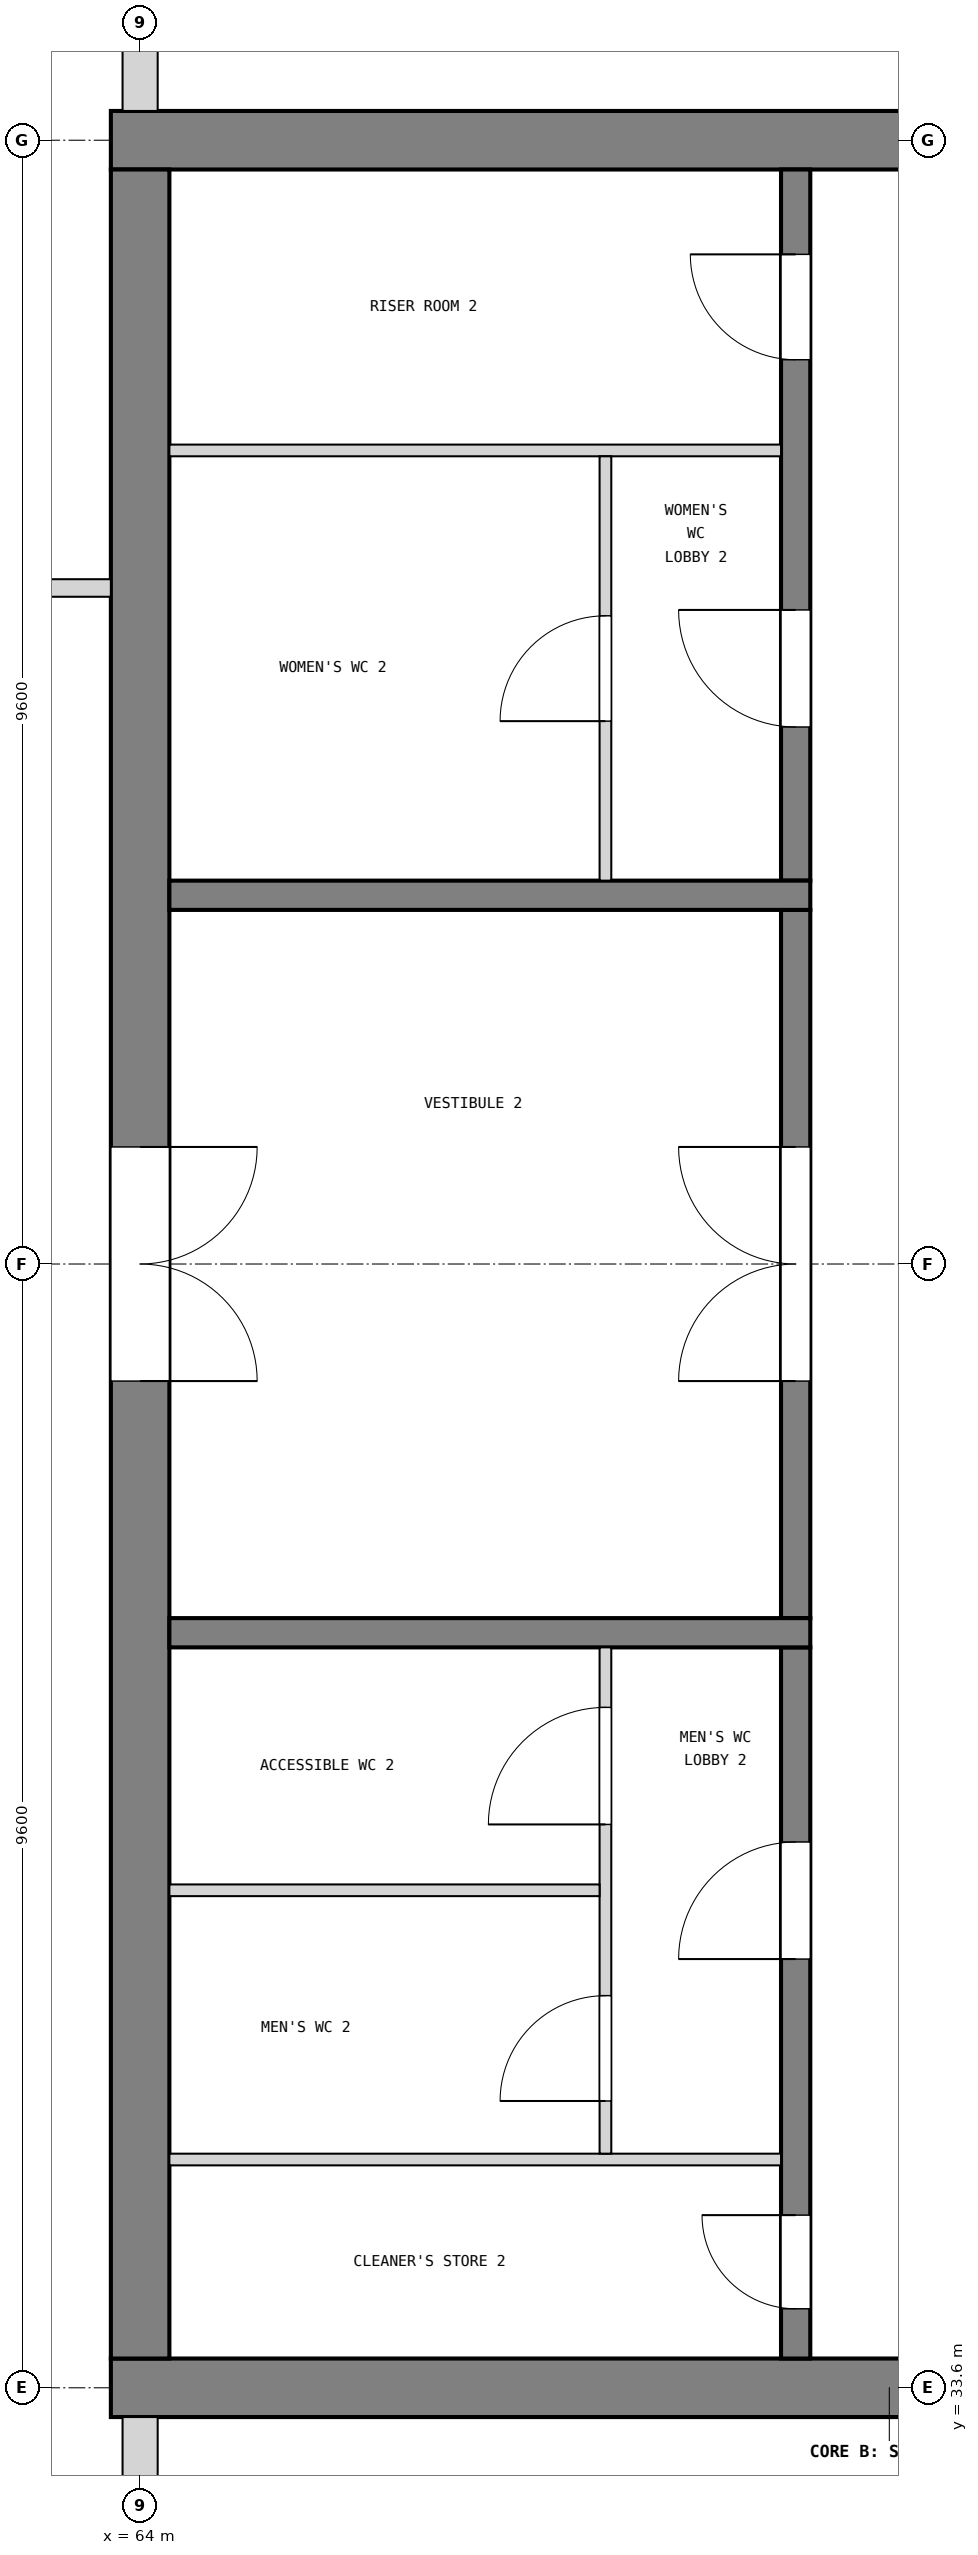
"""IFC4 building model, lengths in metres.
Left out: names, types, materials, properties, quantities, classifications, styles, units other than length and angle.
Written with IfcOpenShell. Run it as: python <this file> out.ifc"""

import sys

from ifc_helpers import new_model, si_unit, direction, frame, frame_2d, origin, place, context, subcontext, project, spatial, rectangle, extrude, element, fill, save


model = new_model("IFC4")
c1 = context("Model", 3, precision=1e-05, world=origin(), true_north=direction((0.0, 1.0)))
c2 = subcontext(c1, "Body", "Model", "MODEL_VIEW")
j1 = project(units=[si_unit("LENGTHUNIT", "METRE"), si_unit("PLANEANGLEUNIT", "RADIAN")], contexts=[c1])
p1 = place(None, origin())
s1 = spatial("IfcSite", under=j1, at=p1, CompositionType="ELEMENT")
p2 = place(p1, origin())
s2 = spatial("IfcBuilding", under=s1, at=p2, CompositionType="ELEMENT")
p3 = place(p2, frame((0.0, 0.0, 32.7)))
s3 = spatial("IfcBuildingStorey", under=s2, at=p3, CompositionType="ELEMENT", Elevation=32.7)
p4 = place(p3, frame((63.75, 52.8, 0.0), z_axis=(0.0, 0.0, 1.0), x_axis=(1.0, 0.0, 0.0)))
e1 = element("IfcWall", 1, at=p4, inside=s3, PredefinedType="SHEAR", context=c2, shape_type="SweptSolid", body=[
    extrude(rectangle(XDim=13.3, YDim=0.5, at=frame_2d((6.65, 0.0))), origin(), (0.0, 0.0, 1.0), 3.9),
])
p5 = place(p4, frame((11.05, 0.0, 1.0)))
e2 = element("IfcOpeningElement", 2, at=p5, cuts=e1, PredefinedType="OPENING", context=c2, shape_type="SweptSolid", body=[
    extrude(rectangle(XDim=0.4, YDim=2.0, at=frame_2d((0.2, 1.0))), frame((0.0, 0.26, 0.0), z_axis=(0.0, -1.0, 0.0), x_axis=(1.0, 0.0, 0.0)), (0.0, 0.0, 1.0), 0.52),
])
p6 = place(p3, frame((63.75, 33.6, 0.0), z_axis=(0.0, 0.0, 1.0), x_axis=(1.0, 0.0, 0.0)))
e3 = element("IfcWall", 3, at=p6, inside=s3, PredefinedType="SHEAR", context=c2, shape_type="SweptSolid", body=[
    extrude(rectangle(XDim=13.3, YDim=0.5, at=frame_2d((6.65, 0.0))), origin(), (0.0, 0.0, 1.0), 3.9),
])
p7 = place(p6, frame((11.05, 0.0, 1.0)))
e4 = element("IfcOpeningElement", 4, at=p7, cuts=e3, PredefinedType="OPENING", context=c2, shape_type="SweptSolid", body=[
    extrude(rectangle(XDim=0.4, YDim=2.0, at=frame_2d((0.2, 1.0))), frame((0.0, 0.26, 0.0), z_axis=(0.0, -1.0, 0.0), x_axis=(1.0, 0.0, 0.0)), (0.0, 0.0, 1.0), 0.52),
])
p8 = place(p3, frame((64.0, 33.85, 0.0), z_axis=(0.0, 0.0, 1.0), x_axis=(0.0, 1.0, 0.0)))
e5 = element("IfcWall", 5, at=p8, inside=s3, PredefinedType="SHEAR", context=c2, shape_type="SweptSolid", body=[
    extrude(rectangle(XDim=18.7, YDim=0.5, at=frame_2d((9.35, 0.0))), origin(), (0.0, 0.0, 1.0), 3.9),
])
p9 = place(p8, frame((8.35, 0.0, 0.0)))
e6 = element("IfcOpeningElement", 6, at=p9, cuts=e5, PredefinedType="OPENING", context=c2, shape_type="SweptSolid", body=[
    extrude(rectangle(XDim=2.0, YDim=2.1, at=frame_2d((1.0, 1.05))), frame((0.0, 0.26, 0.0), z_axis=(0.0, -1.0, 0.0), x_axis=(1.0, 0.0, 0.0)), (0.0, 0.0, 1.0), 0.52),
])
p10 = place(p3, frame((64.0, 31.0, 0.0), z_axis=(0.0, 0.0, 1.0), x_axis=(0.0, 1.0, 0.0)))
e7 = element("IfcWall", 7, at=p10, inside=s3, PredefinedType="SOLIDWALL", context=c2, shape_type="SweptSolid", body=[
    extrude(rectangle(XDim=2.35, YDim=0.3, at=frame_2d((1.175, 0.0))), origin(), (0.0, 0.0, 1.0), 2.88),
])
p11 = place(p3, frame((64.0, 53.05, 0.0), z_axis=(0.0, 0.0, 1.0), x_axis=(0.0, 1.0, 0.0)))
e8 = element("IfcWall", 8, at=p11, inside=s3, PredefinedType="SOLIDWALL", context=c2, shape_type="SweptSolid", body=[
    extrude(rectangle(XDim=2.35, YDim=0.3, at=frame_2d((1.175, 0.0))), origin(), (0.0, 0.0, 1.0), 2.88),
])
p12 = place(p3, frame((69.6, 33.85, 0.0), z_axis=(0.0, 0.0, 1.0), x_axis=(0.0, 1.0, 0.0)))
e9 = element("IfcWall", 9, at=p12, inside=s3, PredefinedType="SOLIDWALL", context=c2, shape_type="SweptSolid", body=[
    extrude(rectangle(XDim=6.075, YDim=0.25, at=frame_2d((3.038, 0.0))), origin(), (0.0, 0.0, 1.0), 3.6),
])
p13 = place(p12, frame((0.425, 0.0, 0.0)))
e10 = element("IfcOpeningElement", 10, at=p13, cuts=e9, PredefinedType="OPENING", context=c2, shape_type="SweptSolid", body=[
    extrude(rectangle(XDim=0.8, YDim=2.1, at=frame_2d((0.4, 1.05))), frame((0.0, 0.135, 0.0), z_axis=(0.0, -1.0, 0.0), x_axis=(1.0, 0.0, 0.0)), (0.0, 0.0, 1.0), 0.27),
])
p14 = place(p12, frame((3.413, 0.0, 0.0)))
e11 = element("IfcOpeningElement", 11, at=p14, cuts=e9, PredefinedType="OPENING", context=c2, shape_type="SweptSolid", body=[
    extrude(rectangle(XDim=1.0, YDim=2.1, at=frame_2d((0.5, 1.05))), frame((0.0, 0.135, 0.0), z_axis=(0.0, -1.0, 0.0), x_axis=(1.0, 0.0, 0.0)), (0.0, 0.0, 1.0), 0.27),
])
p15 = place(p3, frame((69.6, 40.175, 0.0), z_axis=(0.0, 0.0, 1.0), x_axis=(0.0, 1.0, 0.0)))
e12 = element("IfcWall", 12, at=p15, inside=s3, PredefinedType="SOLIDWALL", context=c2, shape_type="SweptSolid", body=[
    extrude(rectangle(XDim=6.05, YDim=0.25, at=frame_2d((3.025, 0.0))), origin(), (0.0, 0.0, 1.0), 3.6),
])
p16 = place(p15, frame((2.025, 0.0, 0.0)))
e13 = element("IfcOpeningElement", 13, at=p16, cuts=e12, PredefinedType="OPENING", context=c2, shape_type="SweptSolid", body=[
    extrude(rectangle(XDim=2.0, YDim=2.1, at=frame_2d((1.0, 1.05))), frame((0.0, 0.135, 0.0), z_axis=(0.0, -1.0, 0.0), x_axis=(1.0, 0.0, 0.0)), (0.0, 0.0, 1.0), 0.27),
])
p17 = place(p3, frame((69.6, 46.475, 0.0), z_axis=(0.0, 0.0, 1.0), x_axis=(0.0, 1.0, 0.0)))
e14 = element("IfcWall", 14, at=p17, inside=s3, PredefinedType="SOLIDWALL", context=c2, shape_type="SweptSolid", body=[
    extrude(rectangle(XDim=6.075, YDim=0.25, at=frame_2d((3.038, 0.0))), origin(), (0.0, 0.0, 1.0), 3.6),
])
p18 = place(p17, frame((1.312, 0.0, 0.0)))
e15 = element("IfcOpeningElement", 15, at=p18, cuts=e14, PredefinedType="OPENING", context=c2, shape_type="SweptSolid", body=[
    extrude(rectangle(XDim=1.0, YDim=2.1, at=frame_2d((0.5, 1.05))), frame((0.0, 0.135, 0.0), z_axis=(0.0, -1.0, 0.0), x_axis=(1.0, 0.0, 0.0)), (0.0, 0.0, 1.0), 0.27),
])
p19 = place(p17, frame((4.45, 0.0, 0.0)))
e16 = element("IfcOpeningElement", 16, at=p19, cuts=e14, PredefinedType="OPENING", context=c2, shape_type="SweptSolid", body=[
    extrude(rectangle(XDim=0.9, YDim=2.1, at=frame_2d((0.45, 1.05))), frame((0.0, 0.135, 0.0), z_axis=(0.0, -1.0, 0.0), x_axis=(1.0, 0.0, 0.0)), (0.0, 0.0, 1.0), 0.27),
])
for number, where, z_axis, x_axis in (
    (17, (69.725, 40.05, 0.0), (0.0, 0.0, 1.0), (-1.0, 0.0, 0.0)),
    (18, (69.725, 46.35, 0.0), (0.0, 0.0, 1.0), (-1.0, 0.0, 0.0)),
):
    element("IfcWall", number, at=place(p3, frame(where, z_axis=z_axis, x_axis=x_axis)), inside=s3, PredefinedType="SOLIDWALL", context=c2, shape_type="SweptSolid", body=[
        extrude(rectangle(XDim=5.475, YDim=0.25, at=frame_2d((2.738, 0.0))), origin(), (0.0, 0.0, 1.0), 3.6),
    ])
p20 = place(p3, frame((69.475, 35.55, 0.0), z_axis=(0.0, 0.0, 1.0), x_axis=(-1.0, 0.0, 0.0)))
e19 = element("IfcWall", 19, at=p20, inside=s3, PredefinedType="PARTITIONING", context=c2, shape_type="SweptSolid", body=[
    extrude(rectangle(XDim=5.225, YDim=0.1, at=frame_2d((2.613, 0.0))), origin(), (0.0, 0.0, 1.0), 3.6),
])
p21 = place(p3, frame((67.975, 35.6, 0.0), z_axis=(0.0, 0.0, 1.0), x_axis=(0.0, 1.0, 0.0)))
e20 = element("IfcWall", 20, at=p21, inside=s3, PredefinedType="PARTITIONING", context=c2, shape_type="SweptSolid", body=[
    extrude(rectangle(XDim=4.325, YDim=0.1, at=frame_2d((2.163, 0.0))), origin(), (0.0, 0.0, 1.0), 3.6),
])
p22 = place(p21, frame((0.45, 0.0, 0.0)))
e21 = element("IfcOpeningElement", 21, at=p22, cuts=e20, PredefinedType="OPENING", context=c2, shape_type="SweptSolid", body=[
    extrude(rectangle(XDim=0.9, YDim=2.1, at=frame_2d((0.45, 1.05))), frame((0.0, 0.06, 0.0), z_axis=(0.0, -1.0, 0.0), x_axis=(1.0, 0.0, 0.0)), (0.0, 0.0, 1.0), 0.12),
])
p23 = place(p21, frame((2.812, 0.0, 0.0)))
e22 = element("IfcOpeningElement", 22, at=p23, cuts=e20, PredefinedType="OPENING", context=c2, shape_type="SweptSolid", body=[
    extrude(rectangle(XDim=1.0, YDim=2.1, at=frame_2d((0.5, 1.05))), frame((0.0, 0.06, 0.0), z_axis=(0.0, -1.0, 0.0), x_axis=(1.0, 0.0, 0.0)), (0.0, 0.0, 1.0), 0.12),
])
p24 = place(p3, frame((67.925, 37.85, 0.0), z_axis=(0.0, 0.0, 1.0), x_axis=(-1.0, 0.0, 0.0)))
e23 = element("IfcWall", 23, at=p24, inside=s3, PredefinedType="PARTITIONING", context=c2, shape_type="SweptSolid", body=[
    extrude(rectangle(XDim=3.675, YDim=0.1, at=frame_2d((1.837, 0.0))), origin(), (0.0, 0.0, 1.0), 3.6),
])
p25 = place(p3, frame((69.475, 50.15, 0.0), z_axis=(0.0, 0.0, 1.0), x_axis=(-1.0, 0.0, 0.0)))
e24 = element("IfcWall", 24, at=p25, inside=s3, PredefinedType="PARTITIONING", context=c2, shape_type="SweptSolid", body=[
    extrude(rectangle(XDim=5.225, YDim=0.1, at=frame_2d((2.613, 0.0))), origin(), (0.0, 0.0, 1.0), 3.6),
])
p26 = place(p3, frame((67.975, 46.475, 0.0), z_axis=(0.0, 0.0, 1.0), x_axis=(0.0, 1.0, 0.0)))
e25 = element("IfcWall", 25, at=p26, inside=s3, PredefinedType="PARTITIONING", context=c2, shape_type="SweptSolid", body=[
    extrude(rectangle(XDim=3.625, YDim=0.1, at=frame_2d((1.812, 0.0))), origin(), (0.0, 0.0, 1.0), 3.6),
])
p27 = place(p26, frame((1.363, 0.0, 0.0)))
e26 = element("IfcOpeningElement", 26, at=p27, cuts=e25, PredefinedType="OPENING", context=c2, shape_type="SweptSolid", body=[
    extrude(rectangle(XDim=0.9, YDim=2.1, at=frame_2d((0.45, 1.05))), frame((0.0, 0.06, 0.0), z_axis=(0.0, -1.0, 0.0), x_axis=(1.0, 0.0, 0.0)), (0.0, 0.0, 1.0), 0.12),
])
p28 = place(p3, frame((57.78, 48.975, 0.0), z_axis=(0.0, 0.0, 1.0), x_axis=(1.0, 0.0, 0.0)))
e27 = element("IfcWall", 27, at=p28, inside=s3, PredefinedType="PARTITIONING", context=c2, shape_type="SweptSolid", body=[
    extrude(rectangle(XDim=5.97, YDim=0.15, at=frame_2d((2.985, 0.0))), origin(), (0.0, 0.0, 1.0), 3.68),
])
p29 = place(p28, frame((2.52, 0.0, 0.0)))
e28 = element("IfcOpeningElement", 28, at=p29, cuts=e27, PredefinedType="OPENING", context=c2, shape_type="SweptSolid", body=[
    extrude(rectangle(XDim=1.0, YDim=2.1, at=frame_2d((0.5, 1.05))), frame((0.0, 0.085, 0.0), z_axis=(0.0, -1.0, 0.0), x_axis=(1.0, 0.0, 0.0)), (0.0, 0.0, 1.0), 0.17),
])
p30 = place(p16, origin())
e29 = element("IfcDoor", 29, at=p30, inside=s3, OperationType="DOUBLE_DOOR_SINGLE_SWING", PredefinedType="DOOR", context=c2, shape_type="SweptSolid", body=[
    extrude(rectangle(XDim=2.0, YDim=2.1, at=frame_2d((1.0, 1.05))), frame((0.0, 0.025, 0.0), z_axis=(0.0, -1.0, 0.0), x_axis=(1.0, 0.0, 0.0)), (0.0, 0.0, 1.0), 0.05),
])
fill(e13, e29)
p31 = place(p9, frame((2.0, 0.0, 0.0), z_axis=(0.0, 0.0, 1.0), x_axis=(-1.0, 0.0, 0.0)))
e30 = element("IfcDoor", 30, at=p31, inside=s3, OperationType="DOUBLE_DOOR_SINGLE_SWING", PredefinedType="DOOR", context=c2, shape_type="SweptSolid", body=[
    extrude(rectangle(XDim=2.0, YDim=2.1, at=frame_2d((1.0, 1.05))), frame((0.0, 0.025, 0.0), z_axis=(0.0, -1.0, 0.0), x_axis=(1.0, 0.0, 0.0)), (0.0, 0.0, 1.0), 0.05),
])
fill(e6, e30)
p32 = place(p13, origin())
e31 = element("IfcDoor", 31, at=p32, inside=s3, OperationType="SINGLE_SWING_RIGHT", PredefinedType="DOOR", context=c2, shape_type="SweptSolid", body=[
    extrude(rectangle(XDim=0.8, YDim=2.1, at=frame_2d((0.4, 1.05))), frame((0.0, 0.025, 0.0), z_axis=(0.0, -1.0, 0.0), x_axis=(1.0, 0.0, 0.0)), (0.0, 0.0, 1.0), 0.05),
])
fill(e10, e31)
p33 = place(p14, origin())
e32 = element("IfcDoor", 32, at=p33, inside=s3, OperationType="SINGLE_SWING_LEFT", PredefinedType="DOOR", context=c2, shape_type="SweptSolid", body=[
    extrude(rectangle(XDim=1.0, YDim=2.1, at=frame_2d((0.5, 1.05))), frame((0.0, 0.025, 0.0), z_axis=(0.0, -1.0, 0.0), x_axis=(1.0, 0.0, 0.0)), (0.0, 0.0, 1.0), 0.05),
])
fill(e11, e32)
p34 = place(p22, origin())
e33 = element("IfcDoor", 33, at=p34, inside=s3, OperationType="SINGLE_SWING_LEFT", PredefinedType="DOOR", context=c2, shape_type="SweptSolid", body=[
    extrude(rectangle(XDim=0.9, YDim=2.1, at=frame_2d((0.45, 1.05))), frame((0.0, 0.025, 0.0), z_axis=(0.0, -1.0, 0.0), x_axis=(1.0, 0.0, 0.0)), (0.0, 0.0, 1.0), 0.05),
])
fill(e21, e33)
p35 = place(p23, origin())
e34 = element("IfcDoor", 34, at=p35, inside=s3, OperationType="SINGLE_SWING_LEFT", PredefinedType="DOOR", context=c2, shape_type="SweptSolid", body=[
    extrude(rectangle(XDim=1.0, YDim=2.1, at=frame_2d((0.5, 1.05))), frame((0.0, 0.025, 0.0), z_axis=(0.0, -1.0, 0.0), x_axis=(1.0, 0.0, 0.0)), (0.0, 0.0, 1.0), 0.05),
])
fill(e22, e34)
p36 = place(p18, origin())
e35 = element("IfcDoor", 35, at=p36, inside=s3, OperationType="SINGLE_SWING_RIGHT", PredefinedType="DOOR", context=c2, shape_type="SweptSolid", body=[
    extrude(rectangle(XDim=1.0, YDim=2.1, at=frame_2d((0.5, 1.05))), frame((0.0, 0.025, 0.0), z_axis=(0.0, -1.0, 0.0), x_axis=(1.0, 0.0, 0.0)), (0.0, 0.0, 1.0), 0.05),
])
fill(e15, e35)
p37 = place(p27, origin())
e36 = element("IfcDoor", 36, at=p37, inside=s3, OperationType="SINGLE_SWING_LEFT", PredefinedType="DOOR", context=c2, shape_type="SweptSolid", body=[
    extrude(rectangle(XDim=0.9, YDim=2.1, at=frame_2d((0.45, 1.05))), frame((0.0, 0.025, 0.0), z_axis=(0.0, -1.0, 0.0), x_axis=(1.0, 0.0, 0.0)), (0.0, 0.0, 1.0), 0.05),
])
fill(e26, e36)
p38 = place(p19, origin())
e37 = element("IfcDoor", 37, at=p38, inside=s3, OperationType="SINGLE_SWING_RIGHT", PredefinedType="DOOR", context=c2, shape_type="SweptSolid", body=[
    extrude(rectangle(XDim=0.9, YDim=2.1, at=frame_2d((0.45, 1.05))), frame((0.0, 0.025, 0.0), z_axis=(0.0, -1.0, 0.0), x_axis=(1.0, 0.0, 0.0)), (0.0, 0.0, 1.0), 0.05),
])
fill(e16, e37)
save(model, sys.argv[1])
